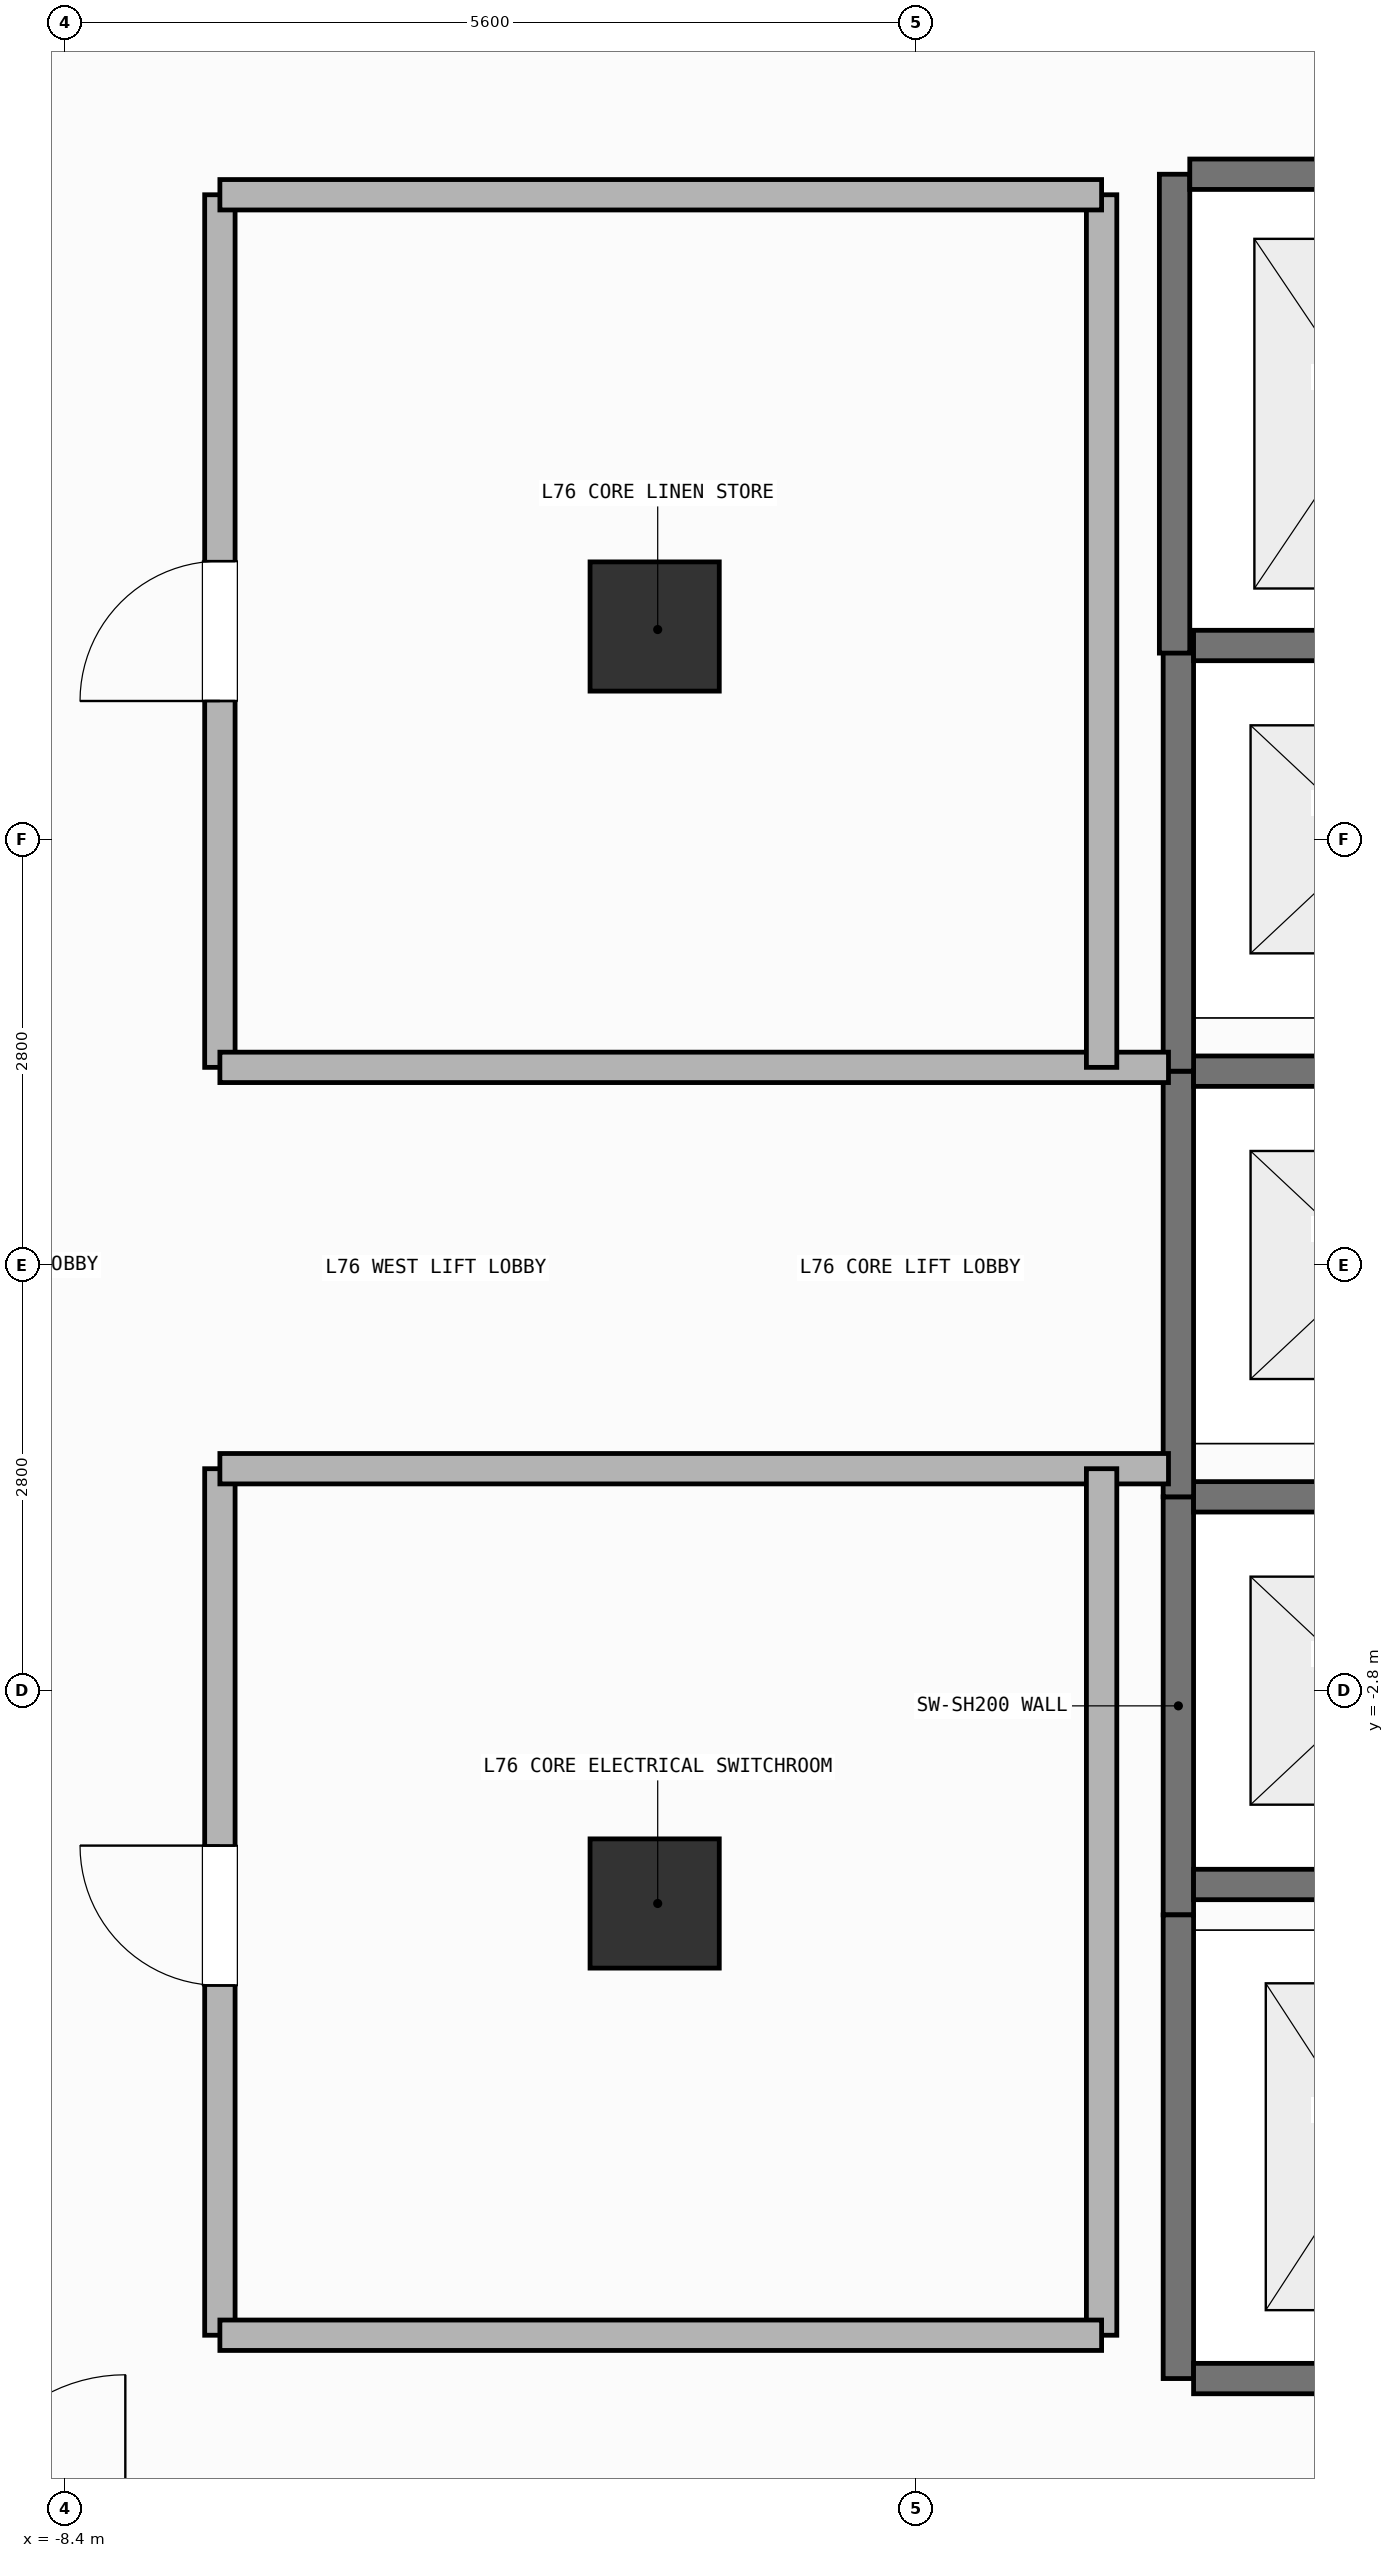
"""IFC4 building model, lengths in metres.
Left out: names, types, materials, properties, quantities, classifications, styles, units other than length and angle.
Written with IfcOpenShell. Run it as: python <this file> out.ifc"""

import sys

from ifc_helpers import new_model, si_unit, direction, frame, frame_2d, origin, origin_2d, place, context, subcontext, project, spatial, rectangle, extrude, element, fill, save


model = new_model("IFC4")
c1 = context("Model", 3, precision=1e-05, world=origin(), true_north=direction((0.0, 1.0)))
c2 = subcontext(c1, "Body", "Model", "MODEL_VIEW")
j1 = project(units=[si_unit("LENGTHUNIT", "METRE"), si_unit("PLANEANGLEUNIT", "RADIAN")], contexts=[c1])
p1 = place(None, origin())
s1 = spatial("IfcSite", under=j1, at=p1, CompositionType="ELEMENT")
p2 = place(p1, origin())
s2 = spatial("IfcBuilding", under=s1, at=p2, CompositionType="ELEMENT")
p3 = place(p2, frame((0.0, 0.0, 309.3)))
s3 = spatial("IfcBuildingStorey", under=s2, at=p3, CompositionType="ELEMENT", Elevation=309.3)
for number, where, z_axis, x_axis in (
    (1, (-4.52, -4.2, 0.0), (0.0, 0.0, 1.0), (1.0, 0.0, 0.0)),
    (2, (-4.52, 4.2, 0.0), (0.0, 0.0, 1.0), (1.0, 0.0, 0.0)),
):
    element("IfcColumn", number, at=place(p3, frame(where, z_axis=z_axis, x_axis=x_axis)), inside=s3, PredefinedType="COLUMN", context=c2, shape_type="SweptSolid", body=[
        extrude(rectangle(XDim=0.85, YDim=0.85, at=origin_2d()), origin(), (0.0, 0.0, 1.0), 3.9),
    ])
p4 = place(p3, frame((-1.075, -4.275, 0.0), z_axis=(0.0, 0.0, 1.0), x_axis=(0.0, 1.0, 0.0)))
e3 = element("IfcWall", 3, at=p4, inside=s3, PredefinedType="SHEAR", context=c2, shape_type="SweptSolid", body=[
    extrude(rectangle(XDim=2.75, YDim=0.2, at=frame_2d((1.375, 0.0))), origin(), (0.0, 0.0, 1.0), 3.64),
])
for number, where, z_axis, x_axis in (
    (4, (-0.975, -4.075, 0.0), (0.0, 0.0, 1.0), (1.0, 0.0, 0.0)),
    (5, (-0.975, -1.525, 0.0), (0.0, 0.0, 1.0), (1.0, 0.0, 0.0)),
):
    element("IfcWall", number, at=place(p3, frame(where, z_axis=z_axis, x_axis=x_axis)), inside=s3, PredefinedType="SHEAR", context=c2, shape_type="SweptSolid", body=[
        extrude(rectangle(XDim=2.35, YDim=0.2, at=frame_2d((1.175, 0.0))), origin(), (0.0, 0.0, 1.0), 3.64),
    ])
p5 = place(p3, frame((-1.075, -1.525, 0.0), z_axis=(0.0, 0.0, 1.0), x_axis=(0.0, 1.0, 0.0)))
e6 = element("IfcWall", 6, at=p5, inside=s3, PredefinedType="SHEAR", context=c2, shape_type="SweptSolid", body=[
    extrude(rectangle(XDim=2.8, YDim=0.2, at=frame_2d((1.4, 0.0))), origin(), (0.0, 0.0, 1.0), 3.64),
])
p6 = place(p3, frame((-0.975, 1.275, 0.0), z_axis=(0.0, 0.0, 1.0), x_axis=(1.0, 0.0, 0.0)))
e7 = element("IfcWall", 7, at=p6, inside=s3, PredefinedType="SHEAR", context=c2, shape_type="SweptSolid", body=[
    extrude(rectangle(XDim=2.35, YDim=0.2, at=frame_2d((1.175, 0.0))), origin(), (0.0, 0.0, 1.0), 3.64),
])
p7 = place(p3, frame((-1.075, 1.275, 0.0), z_axis=(0.0, 0.0, 1.0), x_axis=(0.0, 1.0, 0.0)))
e8 = element("IfcWall", 8, at=p7, inside=s3, PredefinedType="SHEAR", context=c2, shape_type="SweptSolid", body=[
    extrude(rectangle(XDim=2.8, YDim=0.2, at=frame_2d((1.4, 0.0))), origin(), (0.0, 0.0, 1.0), 3.64),
])
p8 = place(p3, frame((-0.975, 4.075, 0.0), z_axis=(0.0, 0.0, 1.0), x_axis=(1.0, 0.0, 0.0)))
e9 = element("IfcWall", 9, at=p8, inside=s3, PredefinedType="SHEAR", context=c2, shape_type="SweptSolid", body=[
    extrude(rectangle(XDim=2.35, YDim=0.2, at=frame_2d((1.175, 0.0))), origin(), (0.0, 0.0, 1.0), 3.64),
])
p9 = place(p3, frame((-1.1, 4.025, 0.0), z_axis=(0.0, 0.0, 1.0), x_axis=(0.0, 1.0, 0.0)))
e10 = element("IfcWall", 10, at=p9, inside=s3, PredefinedType="SHEAR", context=c2, shape_type="SweptSolid", body=[
    extrude(rectangle(XDim=3.15, YDim=0.2, at=frame_2d((1.575, 0.0))), origin(), (0.0, 0.0, 1.0), 3.64),
])
p10 = place(p3, frame((-1.0, 7.175, 0.0), z_axis=(0.0, 0.0, 1.0), x_axis=(1.0, 0.0, 0.0)))
e11 = element("IfcWall", 11, at=p10, inside=s3, PredefinedType="SHEAR", context=c2, shape_type="SweptSolid", body=[
    extrude(rectangle(XDim=2.4, YDim=0.2, at=frame_2d((1.2, 0.0))), origin(), (0.0, 0.0, 1.0), 3.64),
])
p11 = place(p3, frame((-1.075, -7.325, 0.0), z_axis=(0.0, 0.0, 1.0), x_axis=(0.0, 1.0, 0.0)))
e12 = element("IfcWall", 12, at=p11, inside=s3, PredefinedType="SHEAR", context=c2, shape_type="SweptSolid", body=[
    extrude(rectangle(XDim=3.05, YDim=0.2, at=frame_2d((1.525, 0.0))), origin(), (0.0, 0.0, 1.0), 3.64),
])
p12 = place(p3, frame((-0.975, -7.325, 0.0), z_axis=(0.0, 0.0, 1.0), x_axis=(1.0, 0.0, 0.0)))
e13 = element("IfcWall", 13, at=p12, inside=s3, PredefinedType="SHEAR", context=c2, shape_type="SweptSolid", body=[
    extrude(rectangle(XDim=2.35, YDim=0.2, at=frame_2d((1.175, 0.0))), origin(), (0.0, 0.0, 1.0), 3.64),
])
p13 = place(p3, frame((-7.38, -7.04, 0.0), z_axis=(0.0, 0.0, 1.0), x_axis=(0.0, 1.0, 0.0)))
e14 = element("IfcWall", 14, at=p13, inside=s3, PredefinedType="SOLIDWALL", context=c2, shape_type="SweptSolid", body=[
    extrude(rectangle(XDim=5.7, YDim=0.2, at=frame_2d((2.85, 0.0))), origin(), (0.0, 0.0, 1.0), 2.73),
])
p14 = place(p13, frame((2.301, 0.0, 0.0)))
e15 = element("IfcOpeningElement", 15, at=p14, cuts=e14, PredefinedType="OPENING", context=c2, shape_type="SweptSolid", body=[
    extrude(rectangle(XDim=0.92, YDim=2.1, at=frame_2d((0.46, 1.05))), frame((0.0, 0.11, 0.0), z_axis=(0.0, -1.0, 0.0), x_axis=(1.0, 0.0, 0.0)), (0.0, 0.0, 1.0), 0.22),
])
p15 = place(p3, frame((-7.38, 1.3, 0.0), z_axis=(0.0, 0.0, 1.0), x_axis=(0.0, 1.0, 0.0)))
e16 = element("IfcWall", 16, at=p15, inside=s3, PredefinedType="SOLIDWALL", context=c2, shape_type="SweptSolid", body=[
    extrude(rectangle(XDim=5.74, YDim=0.2, at=frame_2d((2.87, 0.0))), origin(), (0.0, 0.0, 1.0), 2.73),
])
p16 = place(p15, frame((2.41, 0.0, 0.0)))
e17 = element("IfcOpeningElement", 17, at=p16, cuts=e16, PredefinedType="OPENING", context=c2, shape_type="SweptSolid", body=[
    extrude(rectangle(XDim=0.92, YDim=2.1, at=frame_2d((0.46, 1.05))), frame((0.0, 0.11, 0.0), z_axis=(0.0, -1.0, 0.0), x_axis=(1.0, 0.0, 0.0)), (0.0, 0.0, 1.0), 0.22),
])
for number, where, z_axis, x_axis in (
    (18, (-7.38, -1.34, 0.0), (0.0, 0.0, 1.0), (1.0, 0.0, 0.0)),
    (19, (-7.38, 1.3, 0.0), (0.0, 0.0, 1.0), (1.0, 0.0, 0.0)),
):
    element("IfcWall", number, at=place(p3, frame(where, z_axis=z_axis, x_axis=x_axis)), inside=s3, PredefinedType="SOLIDWALL", context=c2, shape_type="SweptSolid", body=[
        extrude(rectangle(XDim=6.24, YDim=0.2, at=frame_2d((3.12, 0.0))), origin(), (0.0, 0.0, 1.0), 3.64),
    ])
p17 = place(p3, frame((-1.58, -7.04, 0.0), z_axis=(0.0, 0.0, 1.0), x_axis=(0.0, 1.0, 0.0)))
e20 = element("IfcWall", 20, at=p17, inside=s3, PredefinedType="SOLIDWALL", context=c2, shape_type="SweptSolid", body=[
    extrude(rectangle(XDim=5.7, YDim=0.2, at=frame_2d((2.85, 0.0))), origin(), (0.0, 0.0, 1.0), 3.64),
])
p18 = place(p3, frame((-7.38, -7.04, 0.0), z_axis=(0.0, 0.0, 1.0), x_axis=(1.0, 0.0, 0.0)))
e21 = element("IfcWall", 21, at=p18, inside=s3, PredefinedType="SOLIDWALL", context=c2, shape_type="SweptSolid", body=[
    extrude(rectangle(XDim=5.8, YDim=0.2, at=frame_2d((2.9, 0.0))), origin(), (0.0, 0.0, 1.0), 3.64),
])
p19 = place(p3, frame((-1.58, 1.3, 0.0), z_axis=(0.0, 0.0, 1.0), x_axis=(0.0, 1.0, 0.0)))
e22 = element("IfcWall", 22, at=p19, inside=s3, PredefinedType="SOLIDWALL", context=c2, shape_type="SweptSolid", body=[
    extrude(rectangle(XDim=5.74, YDim=0.2, at=frame_2d((2.87, 0.0))), origin(), (0.0, 0.0, 1.0), 3.64),
])
p20 = place(p3, frame((-7.38, 7.04, 0.0), z_axis=(0.0, 0.0, 1.0), x_axis=(1.0, 0.0, 0.0)))
e23 = element("IfcWall", 23, at=p20, inside=s3, PredefinedType="SOLIDWALL", context=c2, shape_type="SweptSolid", body=[
    extrude(rectangle(XDim=5.8, YDim=0.2, at=frame_2d((2.9, 0.0))), origin(), (0.0, 0.0, 1.0), 3.64),
])
p21 = place(p14, origin())
e24 = element("IfcDoor", 24, at=p21, inside=s3, OperationType="SINGLE_SWING_RIGHT", PredefinedType="DOOR", context=c2, shape_type="SweptSolid", body=[
    extrude(rectangle(XDim=0.92, YDim=2.1, at=frame_2d((0.46, 1.05))), frame((0.0, 0.025, 0.0), z_axis=(0.0, -1.0, 0.0), x_axis=(1.0, 0.0, 0.0)), (0.0, 0.0, 1.0), 0.05),
])
fill(e15, e24)
p22 = place(p16, origin())
e25 = element("IfcDoor", 25, at=p22, inside=s3, OperationType="SINGLE_SWING_LEFT", PredefinedType="DOOR", context=c2, shape_type="SweptSolid", body=[
    extrude(rectangle(XDim=0.92, YDim=2.1, at=frame_2d((0.46, 1.05))), frame((0.0, 0.025, 0.0), z_axis=(0.0, -1.0, 0.0), x_axis=(1.0, 0.0, 0.0)), (0.0, 0.0, 1.0), 0.05),
])
fill(e17, e25)
save(model, sys.argv[1])
